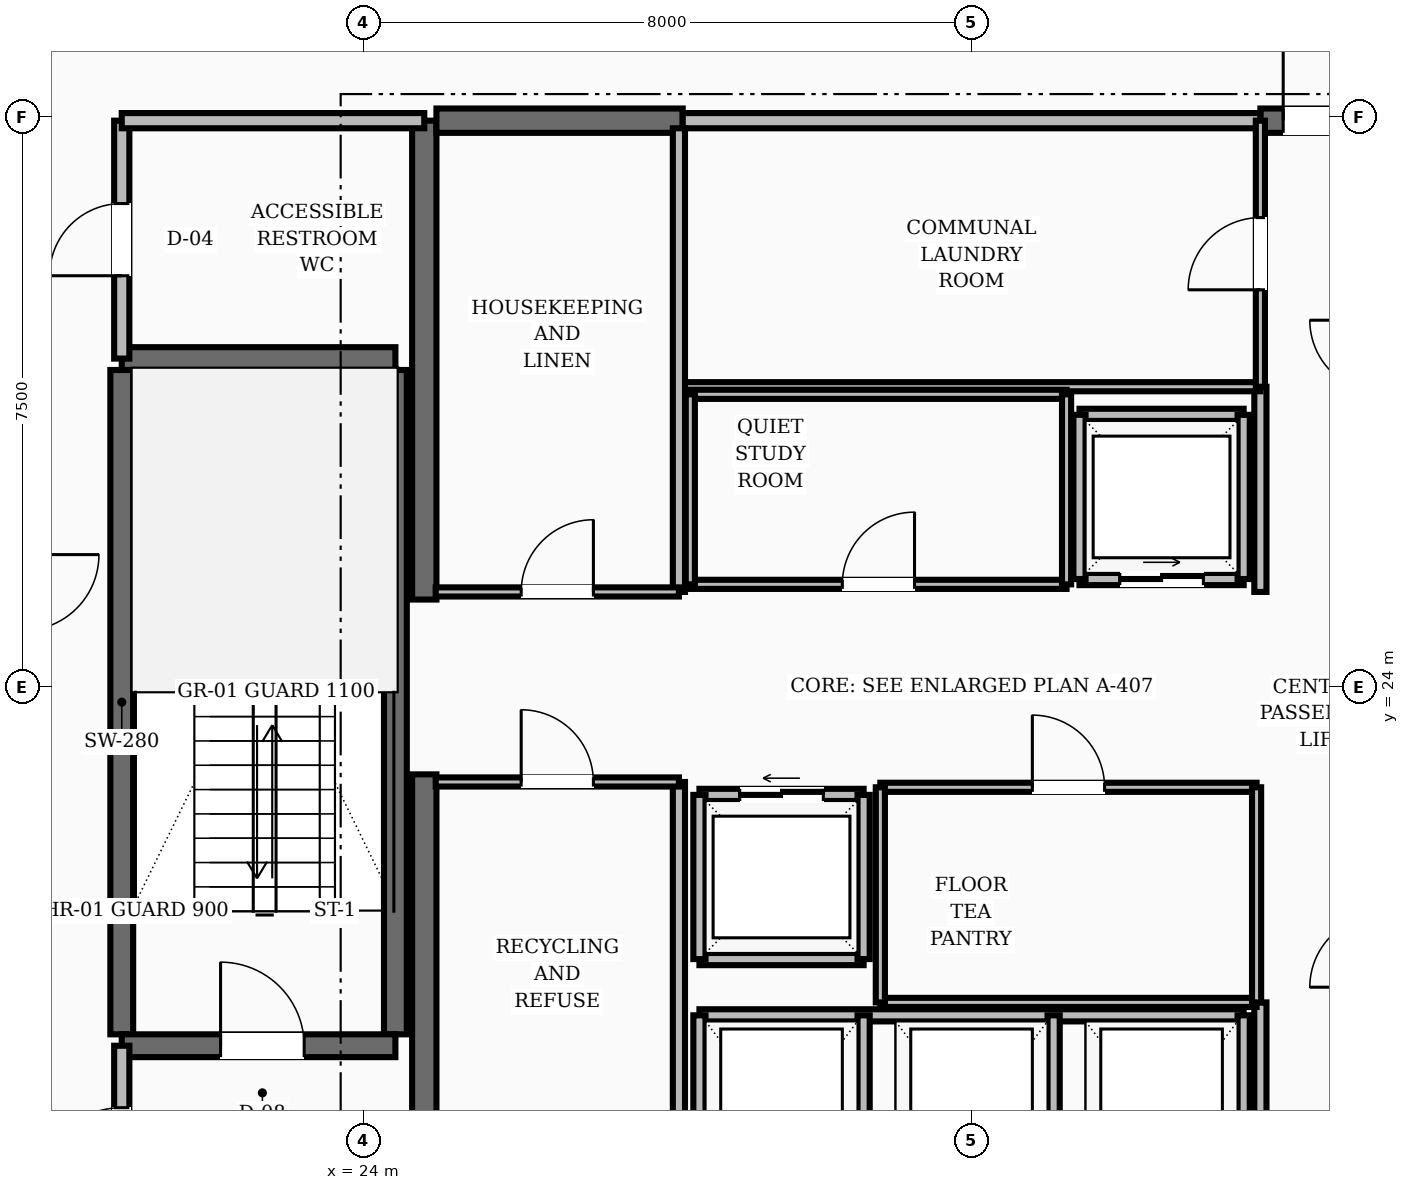
"""IFC4 building model, lengths in metres.
Left out: names, types, materials, properties, quantities, classifications, styles, units other than length and angle.
Written with IfcOpenShell. Run it as: python <this file> out.ifc"""

import sys

from ifc_helpers import new_model, si_unit, direction, frame, frame_2d, origin, place, context, subcontext, project, spatial, rectangle, extrude, element, fill, save


model = new_model("IFC4")
c1 = context("Model", 3, precision=1e-05, world=origin(), true_north=direction((0.0, 1.0)))
c2 = subcontext(c1, "Body", "Model", "MODEL_VIEW")
j1 = project(units=[si_unit("LENGTHUNIT", "METRE"), si_unit("PLANEANGLEUNIT", "RADIAN")], contexts=[c1])
p1 = place(None, origin())
s1 = spatial("IfcSite", under=j1, at=p1, CompositionType="ELEMENT")
p2 = place(p1, origin())
s2 = spatial("IfcBuilding", under=s1, at=p2, CompositionType="ELEMENT")
p3 = place(p2, frame((0.0, 0.0, 229.2)))
s3 = spatial("IfcBuildingStorey", under=s2, at=p3, CompositionType="ELEMENT", Elevation=229.2)
for number, where, z_axis, x_axis in (
    (1, (24.8, 16.55, 0.0), (0.0, 0.0, 1.0), (0.0, 1.0, 0.0)),
    (2, (24.8, 25.15, 0.0), (0.0, 0.0, 1.0), (0.0, 1.0, 0.0)),
):
    element("IfcWall", number, at=place(p3, frame(where, z_axis=z_axis, x_axis=x_axis)), inside=s3, PredefinedType="SHEAR", context=c2, shape_type="SweptSolid", body=[
        extrude(rectangle(XDim=6.3, YDim=0.32, at=frame_2d((3.15, 0.0))), origin(), (0.0, 0.0, 1.0), 3.6),
    ])
p4 = place(p3, frame((24.96, 31.45, 0.0), z_axis=(0.0, 0.0, 1.0), x_axis=(1.0, 0.0, 0.0)))
e3 = element("IfcWall", 3, at=p4, inside=s3, PredefinedType="SHEAR", context=c2, shape_type="SweptSolid", body=[
    extrude(rectangle(XDim=3.24, YDim=0.32, at=frame_2d((1.62, 0.0))), origin(), (0.0, 0.0, 1.0), 3.6),
])
p5 = place(p3, frame((35.8, 31.45, 0.0), z_axis=(0.0, 0.0, 1.0), x_axis=(1.0, 0.0, 0.0)))
e4 = element("IfcWall", 4, at=p5, inside=s3, PredefinedType="SHEAR", context=c2, shape_type="SweptSolid", body=[
    extrude(rectangle(XDim=3.24, YDim=0.32, at=frame_2d((1.62, 0.0))), origin(), (0.0, 0.0, 1.0), 3.6),
])
p6 = place(p5, frame((0.3, 0.0, 0.0)))
e5 = element("IfcOpeningElement", 5, at=p6, cuts=e4, PredefinedType="OPENING", context=c2, shape_type="SweptSolid", body=[
    extrude(rectangle(XDim=1.1, YDim=2.1, at=frame_2d((0.55, 1.05))), frame((0.0, 0.17, 0.0), z_axis=(0.0, -1.0, 0.0), x_axis=(1.0, 0.0, 0.0)), (0.0, 0.0, 1.0), 0.34),
])
for number, where, z_axis, x_axis in (
    (6, (20.82, 19.43, 0.0), (0.0, 0.0, 1.0), (0.0, 1.0, 0.0)),
    (7, (24.42, 19.43, 0.0), (0.0, 0.0, 1.0), (0.0, 1.0, 0.0)),
):
    element("IfcWall", number, at=place(p3, frame(where, z_axis=z_axis, x_axis=x_axis)), inside=s3, PredefinedType="SHEAR", context=c2, shape_type="SweptSolid", body=[
        extrude(rectangle(XDim=8.74, YDim=0.3, at=frame_2d((4.37, 0.0))), origin(), (0.0, 0.0, 1.0), 3.6),
    ])
p7 = place(p3, frame((20.82, 19.28, 0.0), z_axis=(0.0, 0.0, 1.0), x_axis=(1.0, 0.0, 0.0)))
e8 = element("IfcWall", 8, at=p7, inside=s3, PredefinedType="SHEAR", context=c2, shape_type="SweptSolid", body=[
    extrude(rectangle(XDim=3.6, YDim=0.3, at=frame_2d((1.8, 0.0))), origin(), (0.0, 0.0, 1.0), 3.6),
])
p8 = place(p7, frame((1.3, 0.0, 0.0)))
e9 = element("IfcOpeningElement", 9, at=p8, cuts=e8, PredefinedType="OPENING", context=c2, shape_type="SweptSolid", body=[
    extrude(rectangle(XDim=1.1, YDim=2.1, at=frame_2d((0.55, 1.05))), frame((0.0, 0.16, 0.0), z_axis=(0.0, -1.0, 0.0), x_axis=(1.0, 0.0, 0.0)), (0.0, 0.0, 1.0), 0.32),
])
p9 = place(p3, frame((20.82, 28.32, 0.0), z_axis=(0.0, 0.0, 1.0), x_axis=(1.0, 0.0, 0.0)))
e10 = element("IfcWall", 10, at=p9, inside=s3, PredefinedType="SHEAR", context=c2, shape_type="SweptSolid", body=[
    extrude(rectangle(XDim=3.6, YDim=0.3, at=frame_2d((1.8, 0.0))), origin(), (0.0, 0.0, 1.0), 3.6),
])
p10 = place(p3, frame((20.82, 16.55, 0.0), z_axis=(0.0, 0.0, 1.0), x_axis=(0.0, 1.0, 0.0)))
e11 = element("IfcWall", 11, at=p10, inside=s3, PredefinedType="SOLIDWALL", context=c2, shape_type="SweptSolid", body=[
    extrude(rectangle(XDim=2.73, YDim=0.2, at=frame_2d((1.365, 0.0))), origin(), (0.0, 0.0, 1.0), 2.87),
])
p11 = place(p10, frame((0.815, 0.0, 0.0)))
e12 = element("IfcOpeningElement", 12, at=p11, cuts=e11, PredefinedType="OPENING", context=c2, shape_type="SweptSolid", body=[
    extrude(rectangle(XDim=1.1, YDim=2.1, at=frame_2d((0.55, 1.05))), frame((0.0, 0.11, 0.0), z_axis=(0.0, -1.0, 0.0), x_axis=(1.0, 0.0, 0.0)), (0.0, 0.0, 1.0), 0.22),
])
p12 = place(p3, frame((20.82, 28.32, 0.0), z_axis=(0.0, 0.0, 1.0), x_axis=(0.0, 1.0, 0.0)))
e13 = element("IfcWall", 13, at=p12, inside=s3, PredefinedType="SOLIDWALL", context=c2, shape_type="SweptSolid", body=[
    extrude(rectangle(XDim=3.13, YDim=0.2, at=frame_2d((1.565, 0.0))), origin(), (0.0, 0.0, 1.0), 2.87),
])
p13 = place(p12, frame((1.09, 0.0, 0.0)))
e14 = element("IfcOpeningElement", 14, at=p13, cuts=e13, PredefinedType="OPENING", context=c2, shape_type="SweptSolid", body=[
    extrude(rectangle(XDim=0.95, YDim=2.1, at=frame_2d((0.475, 1.05))), frame((0.0, 0.11, 0.0), z_axis=(0.0, -1.0, 0.0), x_axis=(1.0, 0.0, 0.0)), (0.0, 0.0, 1.0), 0.22),
])
p14 = place(p3, frame((20.82, 31.45, 0.0), z_axis=(0.0, 0.0, 1.0), x_axis=(1.0, 0.0, 0.0)))
e15 = element("IfcWall", 15, at=p14, inside=s3, PredefinedType="SOLIDWALL", context=c2, shape_type="SweptSolid", body=[
    extrude(rectangle(XDim=3.98, YDim=0.2, at=frame_2d((1.99, 0.0))), origin(), (0.0, 0.0, 1.0), 2.87),
])
p15 = place(p3, frame((35.8, 16.55, 0.0), z_axis=(0.0, 0.0, 1.0), x_axis=(0.0, 1.0, 0.0)))
e16 = element("IfcWall", 16, at=p15, inside=s3, PredefinedType="SOLIDWALL", context=c2, shape_type="SweptSolid", body=[
    extrude(rectangle(XDim=3.3, YDim=0.16, at=frame_2d((1.65, 0.0))), origin(), (0.0, 0.0, 1.0), 2.87),
])
p16 = place(p3, frame((35.8, 25.25, 0.0), z_axis=(0.0, 0.0, 1.0), x_axis=(0.0, 1.0, 0.0)))
e17 = element("IfcWall", 17, at=p16, inside=s3, PredefinedType="SOLIDWALL", context=c2, shape_type="SweptSolid", body=[
    extrude(rectangle(XDim=2.7, YDim=0.16, at=frame_2d((1.35, 0.0))), origin(), (0.0, 0.0, 1.0), 2.87),
])
p17 = place(p3, frame((33.42, 25.42, 0.0), z_axis=(0.0, 0.0, 1.0), x_axis=(1.0, 0.0, 0.0)))
e18 = element("IfcWall", 18, at=p17, inside=s3, PredefinedType="SOLIDWALL", context=c2, shape_type="SweptSolid", body=[
    extrude(rectangle(XDim=2.16, YDim=0.16, at=frame_2d((1.08, 0.0))), origin(), (0.0, 0.0, 1.0), 2.87),
])
p18 = place(p17, frame((0.53, 0.0, 0.0)))
e19 = element("IfcOpeningElement", 19, at=p18, cuts=e18, PredefinedType="OPENING", context=c2, shape_type="SweptSolid", body=[
    extrude(rectangle(XDim=1.1, YDim=2.15, at=frame_2d((0.55, 1.075))), frame((0.0, 0.09, 0.0), z_axis=(0.0, -1.0, 0.0), x_axis=(1.0, 0.0, 0.0)), (0.0, 0.0, 1.0), 0.18),
])
for number, where, z_axis, x_axis in (
    (20, (33.42, 27.58, 0.0), (0.0, 0.0, 1.0), (1.0, 0.0, 0.0)),
    (21, (33.42, 25.42, 0.0), (0.0, 0.0, 1.0), (0.0, 1.0, 0.0)),
    (22, (35.58, 25.42, 0.0), (0.0, 0.0, 1.0), (0.0, 1.0, 0.0)),
):
    element("IfcWall", number, at=place(p3, frame(where, z_axis=z_axis, x_axis=x_axis)), inside=s3, PredefinedType="SOLIDWALL", context=c2, shape_type="SweptSolid", body=[
        extrude(rectangle(XDim=2.16, YDim=0.16, at=frame_2d((1.08, 0.0))), origin(), (0.0, 0.0, 1.0), 2.87),
    ])
p19 = place(p3, frame((28.42, 22.58, 0.0), z_axis=(0.0, 0.0, 1.0), x_axis=(1.0, 0.0, 0.0)))
e23 = element("IfcWall", 23, at=p19, inside=s3, PredefinedType="SOLIDWALL", context=c2, shape_type="SweptSolid", body=[
    extrude(rectangle(XDim=2.16, YDim=0.16, at=frame_2d((1.08, 0.0))), origin(), (0.0, 0.0, 1.0), 2.87),
])
p20 = place(p19, frame((0.53, 0.0, 0.0)))
e24 = element("IfcOpeningElement", 24, at=p20, cuts=e23, PredefinedType="OPENING", context=c2, shape_type="SweptSolid", body=[
    extrude(rectangle(XDim=1.1, YDim=2.15, at=frame_2d((0.55, 1.075))), frame((0.0, 0.09, 0.0), z_axis=(0.0, -1.0, 0.0), x_axis=(1.0, 0.0, 0.0)), (0.0, 0.0, 1.0), 0.18),
])
for number, where, z_axis, x_axis in (
    (25, (28.42, 20.42, 0.0), (0.0, 0.0, 1.0), (1.0, 0.0, 0.0)),
    (26, (28.42, 20.42, 0.0), (0.0, 0.0, 1.0), (0.0, 1.0, 0.0)),
    (27, (30.58, 20.42, 0.0), (0.0, 0.0, 1.0), (0.0, 1.0, 0.0)),
):
    element("IfcWall", number, at=place(p3, frame(where, z_axis=z_axis, x_axis=x_axis)), inside=s3, PredefinedType="SOLIDWALL", context=c2, shape_type="SweptSolid", body=[
        extrude(rectangle(XDim=2.16, YDim=0.16, at=frame_2d((1.08, 0.0))), origin(), (0.0, 0.0, 1.0), 2.87),
    ])
p21 = place(p3, frame((28.42, 19.68, 0.0), z_axis=(0.0, 0.0, 1.0), x_axis=(1.0, 0.0, 0.0)))
e28 = element("IfcWall", 28, at=p21, inside=s3, PredefinedType="SOLIDWALL", context=c2, shape_type="SweptSolid", body=[
    extrude(rectangle(XDim=7.16, YDim=0.16, at=frame_2d((3.58, 0.0))), origin(), (0.0, 0.0, 1.0), 2.87),
])
for number, where, z_axis, x_axis in (
    (29, (28.42, 16.92, 0.0), (0.0, 0.0, 1.0), (0.0, 1.0, 0.0)),
    (30, (30.58, 16.92, 0.0), (0.0, 0.0, 1.0), (0.0, 1.0, 0.0)),
    (31, (33.08, 16.92, 0.0), (0.0, 0.0, 1.0), (0.0, 1.0, 0.0)),
    (32, (35.58, 16.92, 0.0), (0.0, 0.0, 1.0), (0.0, 1.0, 0.0)),
):
    element("IfcWall", number, at=place(p3, frame(where, z_axis=z_axis, x_axis=x_axis)), inside=s3, PredefinedType="SOLIDWALL", context=c2, shape_type="SweptSolid", body=[
        extrude(rectangle(XDim=2.76, YDim=0.16, at=frame_2d((1.38, 0.0))), origin(), (0.0, 0.0, 1.0), 2.87),
    ])
p22 = place(p3, frame((28.2, 31.45, 0.0), z_axis=(0.0, 0.0, 1.0), x_axis=(1.0, 0.0, 0.0)))
e33 = element("IfcWall", 33, at=p22, inside=s3, PredefinedType="SOLIDWALL", context=c2, shape_type="SweptSolid", body=[
    extrude(rectangle(XDim=7.6, YDim=0.2, at=frame_2d((3.8, 0.0))), origin(), (0.0, 0.0, 1.0), 2.87),
])
p23 = place(p3, frame((28.2, 27.95, 0.0), z_axis=(0.0, 0.0, 1.0), x_axis=(1.0, 0.0, 0.0)))
e34 = element("IfcWall", 34, at=p23, inside=s3, PredefinedType="PARTITIONING", context=c2, shape_type="SweptSolid", body=[
    extrude(rectangle(XDim=7.6, YDim=0.12, at=frame_2d((3.8, 0.0))), origin(), (0.0, 0.0, 1.0), 2.87),
])
p24 = place(p3, frame((35.8, 27.95, 0.0), z_axis=(0.0, 0.0, 1.0), x_axis=(0.0, 1.0, 0.0)))
e35 = element("IfcWall", 35, at=p24, inside=s3, PredefinedType="PARTITIONING", context=c2, shape_type="SweptSolid", body=[
    extrude(rectangle(XDim=3.5, YDim=0.12, at=frame_2d((1.75, 0.0))), origin(), (0.0, 0.0, 1.0), 2.87),
])
p25 = place(p24, frame((1.275, 0.0, 0.0)))
e36 = element("IfcOpeningElement", 36, at=p25, cuts=e35, PredefinedType="OPENING", context=c2, shape_type="SweptSolid", body=[
    extrude(rectangle(XDim=0.95, YDim=2.1, at=frame_2d((0.475, 1.05))), frame((0.0, 0.07, 0.0), z_axis=(0.0, -1.0, 0.0), x_axis=(1.0, 0.0, 0.0)), (0.0, 0.0, 1.0), 0.14),
])
p26 = place(p3, frame((28.3, 25.35, 0.0), z_axis=(0.0, 0.0, 1.0), x_axis=(1.0, 0.0, 0.0)))
e37 = element("IfcWall", 37, at=p26, inside=s3, PredefinedType="PARTITIONING", context=c2, shape_type="SweptSolid", body=[
    extrude(rectangle(XDim=4.95, YDim=0.12, at=frame_2d((2.475, 0.0))), origin(), (0.0, 0.0, 1.0), 2.87),
])
p27 = place(p26, frame((2.0, 0.0, 0.0)))
e38 = element("IfcOpeningElement", 38, at=p27, cuts=e37, PredefinedType="OPENING", context=c2, shape_type="SweptSolid", body=[
    extrude(rectangle(XDim=0.95, YDim=2.1, at=frame_2d((0.475, 1.05))), frame((0.0, 0.07, 0.0), z_axis=(0.0, -1.0, 0.0), x_axis=(1.0, 0.0, 0.0)), (0.0, 0.0, 1.0), 0.14),
])
p28 = place(p3, frame((28.3, 27.85, 0.0), z_axis=(0.0, 0.0, 1.0), x_axis=(1.0, 0.0, 0.0)))
e39 = element("IfcWall", 39, at=p28, inside=s3, PredefinedType="PARTITIONING", context=c2, shape_type="SweptSolid", body=[
    extrude(rectangle(XDim=4.95, YDim=0.12, at=frame_2d((2.475, 0.0))), origin(), (0.0, 0.0, 1.0), 2.87),
])
for number, where, z_axis, x_axis in (
    (40, (28.3, 25.35, 0.0), (0.0, 0.0, 1.0), (0.0, 1.0, 0.0)),
    (41, (33.25, 25.35, 0.0), (0.0, 0.0, 1.0), (0.0, 1.0, 0.0)),
):
    element("IfcWall", number, at=place(p3, frame(where, z_axis=z_axis, x_axis=x_axis)), inside=s3, PredefinedType="PARTITIONING", context=c2, shape_type="SweptSolid", body=[
        extrude(rectangle(XDim=2.5, YDim=0.12, at=frame_2d((1.25, 0.0))), origin(), (0.0, 0.0, 1.0), 2.87),
    ])
p29 = place(p3, frame((30.8, 22.68, 0.0), z_axis=(0.0, 0.0, 1.0), x_axis=(1.0, 0.0, 0.0)))
e42 = element("IfcWall", 42, at=p29, inside=s3, PredefinedType="PARTITIONING", context=c2, shape_type="SweptSolid", body=[
    extrude(rectangle(XDim=4.95, YDim=0.12, at=frame_2d((2.475, 0.0))), origin(), (0.0, 0.0, 1.0), 2.87),
])
p30 = place(p29, frame((2.0, 0.0, 0.0)))
e43 = element("IfcOpeningElement", 43, at=p30, cuts=e42, PredefinedType="OPENING", context=c2, shape_type="SweptSolid", body=[
    extrude(rectangle(XDim=0.95, YDim=2.1, at=frame_2d((0.475, 1.05))), frame((0.0, 0.07, 0.0), z_axis=(0.0, -1.0, 0.0), x_axis=(1.0, 0.0, 0.0)), (0.0, 0.0, 1.0), 0.14),
])
p31 = place(p3, frame((30.8, 19.85, 0.0), z_axis=(0.0, 0.0, 1.0), x_axis=(1.0, 0.0, 0.0)))
e44 = element("IfcWall", 44, at=p31, inside=s3, PredefinedType="PARTITIONING", context=c2, shape_type="SweptSolid", body=[
    extrude(rectangle(XDim=4.95, YDim=0.12, at=frame_2d((2.475, 0.0))), origin(), (0.0, 0.0, 1.0), 2.87),
])
for number, where, z_axis, x_axis in (
    (45, (30.8, 19.85, 0.0), (0.0, 0.0, 1.0), (0.0, 1.0, 0.0)),
    (46, (35.75, 19.85, 0.0), (0.0, 0.0, 1.0), (0.0, 1.0, 0.0)),
):
    element("IfcWall", number, at=place(p3, frame(where, z_axis=z_axis, x_axis=x_axis)), inside=s3, PredefinedType="PARTITIONING", context=c2, shape_type="SweptSolid", body=[
        extrude(rectangle(XDim=2.83, YDim=0.12, at=frame_2d((1.415, 0.0))), origin(), (0.0, 0.0, 1.0), 2.87),
    ])
p32 = place(p3, frame((28.15, 16.7, 0.0), z_axis=(0.0, 0.0, 1.0), x_axis=(0.0, 1.0, 0.0)))
e47 = element("IfcWall", 47, at=p32, inside=s3, PredefinedType="SOLIDWALL", context=c2, shape_type="SweptSolid", body=[
    extrude(rectangle(XDim=6.05, YDim=0.16, at=frame_2d((3.025, 0.0))), origin(), (0.0, 0.0, 1.0), 2.87),
])
p33 = place(p3, frame((28.15, 25.25, 0.0), z_axis=(0.0, 0.0, 1.0), x_axis=(0.0, 1.0, 0.0)))
e48 = element("IfcWall", 48, at=p33, inside=s3, PredefinedType="SOLIDWALL", context=c2, shape_type="SweptSolid", body=[
    extrude(rectangle(XDim=6.1, YDim=0.16, at=frame_2d((3.05, 0.0))), origin(), (0.0, 0.0, 1.0), 2.87),
])
p34 = place(p3, frame((24.95, 25.25, 0.0), z_axis=(0.0, 0.0, 1.0), x_axis=(1.0, 0.0, 0.0)))
e49 = element("IfcWall", 49, at=p34, inside=s3, PredefinedType="PARTITIONING", context=c2, shape_type="SweptSolid", body=[
    extrude(rectangle(XDim=3.2, YDim=0.12, at=frame_2d((1.6, 0.0))), origin(), (0.0, 0.0, 1.0), 2.87),
])
p35 = place(p34, frame((1.125, 0.0, 0.0)))
e50 = element("IfcOpeningElement", 50, at=p35, cuts=e49, PredefinedType="OPENING", context=c2, shape_type="SweptSolid", body=[
    extrude(rectangle(XDim=0.95, YDim=2.1, at=frame_2d((0.475, 1.05))), frame((0.0, 0.07, 0.0), z_axis=(0.0, -1.0, 0.0), x_axis=(1.0, 0.0, 0.0)), (0.0, 0.0, 1.0), 0.14),
])
p36 = place(p3, frame((24.95, 22.75, 0.0), z_axis=(0.0, 0.0, 1.0), x_axis=(1.0, 0.0, 0.0)))
e51 = element("IfcWall", 51, at=p36, inside=s3, PredefinedType="PARTITIONING", context=c2, shape_type="SweptSolid", body=[
    extrude(rectangle(XDim=3.2, YDim=0.12, at=frame_2d((1.6, 0.0))), origin(), (0.0, 0.0, 1.0), 2.87),
])
p37 = place(p36, frame((1.125, 0.0, 0.0)))
e52 = element("IfcOpeningElement", 52, at=p37, cuts=e51, PredefinedType="OPENING", context=c2, shape_type="SweptSolid", body=[
    extrude(rectangle(XDim=0.95, YDim=2.1, at=frame_2d((0.475, 1.05))), frame((0.0, 0.07, 0.0), z_axis=(0.0, -1.0, 0.0), x_axis=(1.0, 0.0, 0.0)), (0.0, 0.0, 1.0), 0.14),
])
p38 = place(p3, frame((21.635, 34.365, 0.0), z_axis=(0.0, 0.0, 1.0), x_axis=(-0.707106781187, -0.707106781187, 0.0)))
e53 = element("IfcWall", 53, at=p38, inside=s3, PredefinedType="SOLIDWALL", context=c2, shape_type="SweptSolid", body=[
    extrude(rectangle(XDim=2.916, YDim=0.16, at=frame_2d((1.458, 0.0))), origin(), (0.0, 0.0, 1.0), 2.87),
])
p39 = place(p8, origin())
e54 = element("IfcDoor", 54, at=p39, inside=s3, OperationType="SINGLE_SWING_LEFT", PredefinedType="DOOR", context=c2, shape_type="SweptSolid", body=[
    extrude(rectangle(XDim=1.1, YDim=2.1, at=frame_2d((0.55, 1.05))), frame((0.0, 0.025, 0.0), z_axis=(0.0, -1.0, 0.0), x_axis=(1.0, 0.0, 0.0)), (0.0, 0.0, 1.0), 0.05),
])
fill(e9, e54)
p40 = place(p11, origin())
e55 = element("IfcDoor", 55, at=p40, inside=s3, OperationType="SINGLE_SWING_LEFT", PredefinedType="DOOR", context=c2, shape_type="SweptSolid", body=[
    extrude(rectangle(XDim=1.1, YDim=2.1, at=frame_2d((0.55, 1.05))), frame((0.0, 0.025, 0.0), z_axis=(0.0, -1.0, 0.0), x_axis=(1.0, 0.0, 0.0)), (0.0, 0.0, 1.0), 0.05),
])
fill(e12, e55)
p41 = place(p13, origin())
e56 = element("IfcDoor", 56, at=p41, inside=s3, OperationType="SINGLE_SWING_LEFT", PredefinedType="DOOR", context=c2, shape_type="SweptSolid", body=[
    extrude(rectangle(XDim=0.95, YDim=2.1, at=frame_2d((0.475, 1.05))), frame((0.0, 0.025, 0.0), z_axis=(0.0, -1.0, 0.0), x_axis=(1.0, 0.0, 0.0)), (0.0, 0.0, 1.0), 0.05),
])
fill(e14, e56)
p42 = place(p6, origin())
e57 = element("IfcDoor", 57, at=p42, inside=s3, OperationType="SINGLE_SWING_LEFT", PredefinedType="DOOR", context=c2, shape_type="SweptSolid", body=[
    extrude(rectangle(XDim=1.1, YDim=2.1, at=frame_2d((0.55, 1.05))), frame((0.0, 0.025, 0.0), z_axis=(0.0, -1.0, 0.0), x_axis=(1.0, 0.0, 0.0)), (0.0, 0.0, 1.0), 0.05),
])
fill(e5, e57)
p43 = place(p18, origin())
e58 = element("IfcDoor", 58, at=p43, inside=s3, OperationType="SLIDING_TO_RIGHT", PredefinedType="DOOR", context=c2, shape_type="SweptSolid", body=[
    extrude(rectangle(XDim=1.1, YDim=2.15, at=frame_2d((0.55, 1.075))), frame((0.0, 0.025, 0.0), z_axis=(0.0, -1.0, 0.0), x_axis=(1.0, 0.0, 0.0)), (0.0, 0.0, 1.0), 0.05),
])
fill(e19, e58)
p44 = place(p20, origin())
e59 = element("IfcDoor", 59, at=p44, inside=s3, OperationType="SLIDING_TO_LEFT", PredefinedType="DOOR", context=c2, shape_type="SweptSolid", body=[
    extrude(rectangle(XDim=1.1, YDim=2.15, at=frame_2d((0.55, 1.075))), frame((0.0, 0.025, 0.0), z_axis=(0.0, -1.0, 0.0), x_axis=(1.0, 0.0, 0.0)), (0.0, 0.0, 1.0), 0.05),
])
fill(e24, e59)
p45 = place(p25, origin())
e60 = element("IfcDoor", 60, at=p45, inside=s3, OperationType="SINGLE_SWING_LEFT", PredefinedType="DOOR", context=c2, shape_type="SweptSolid", body=[
    extrude(rectangle(XDim=0.95, YDim=2.1, at=frame_2d((0.475, 1.05))), frame((0.0, 0.025, 0.0), z_axis=(0.0, -1.0, 0.0), x_axis=(1.0, 0.0, 0.0)), (0.0, 0.0, 1.0), 0.05),
])
fill(e36, e60)
p46 = place(p27, origin())
e61 = element("IfcDoor", 61, at=p46, inside=s3, OperationType="SINGLE_SWING_RIGHT", PredefinedType="DOOR", context=c2, shape_type="SweptSolid", body=[
    extrude(rectangle(XDim=0.95, YDim=2.1, at=frame_2d((0.475, 1.05))), frame((0.0, 0.025, 0.0), z_axis=(0.0, -1.0, 0.0), x_axis=(1.0, 0.0, 0.0)), (0.0, 0.0, 1.0), 0.05),
])
fill(e38, e61)
p47 = place(p30, origin())
e62 = element("IfcDoor", 62, at=p47, inside=s3, OperationType="SINGLE_SWING_LEFT", PredefinedType="DOOR", context=c2, shape_type="SweptSolid", body=[
    extrude(rectangle(XDim=0.95, YDim=2.1, at=frame_2d((0.475, 1.05))), frame((0.0, 0.025, 0.0), z_axis=(0.0, -1.0, 0.0), x_axis=(1.0, 0.0, 0.0)), (0.0, 0.0, 1.0), 0.05),
])
fill(e43, e62)
p48 = place(p35, origin())
e63 = element("IfcDoor", 63, at=p48, inside=s3, OperationType="SINGLE_SWING_RIGHT", PredefinedType="DOOR", context=c2, shape_type="SweptSolid", body=[
    extrude(rectangle(XDim=0.95, YDim=2.1, at=frame_2d((0.475, 1.05))), frame((0.0, 0.025, 0.0), z_axis=(0.0, -1.0, 0.0), x_axis=(1.0, 0.0, 0.0)), (0.0, 0.0, 1.0), 0.05),
])
fill(e50, e63)
p49 = place(p37, origin())
e64 = element("IfcDoor", 64, at=p49, inside=s3, OperationType="SINGLE_SWING_LEFT", PredefinedType="DOOR", context=c2, shape_type="SweptSolid", body=[
    extrude(rectangle(XDim=0.95, YDim=2.1, at=frame_2d((0.475, 1.05))), frame((0.0, 0.025, 0.0), z_axis=(0.0, -1.0, 0.0), x_axis=(1.0, 0.0, 0.0)), (0.0, 0.0, 1.0), 0.05),
])
fill(e52, e64)
save(model, sys.argv[1])
